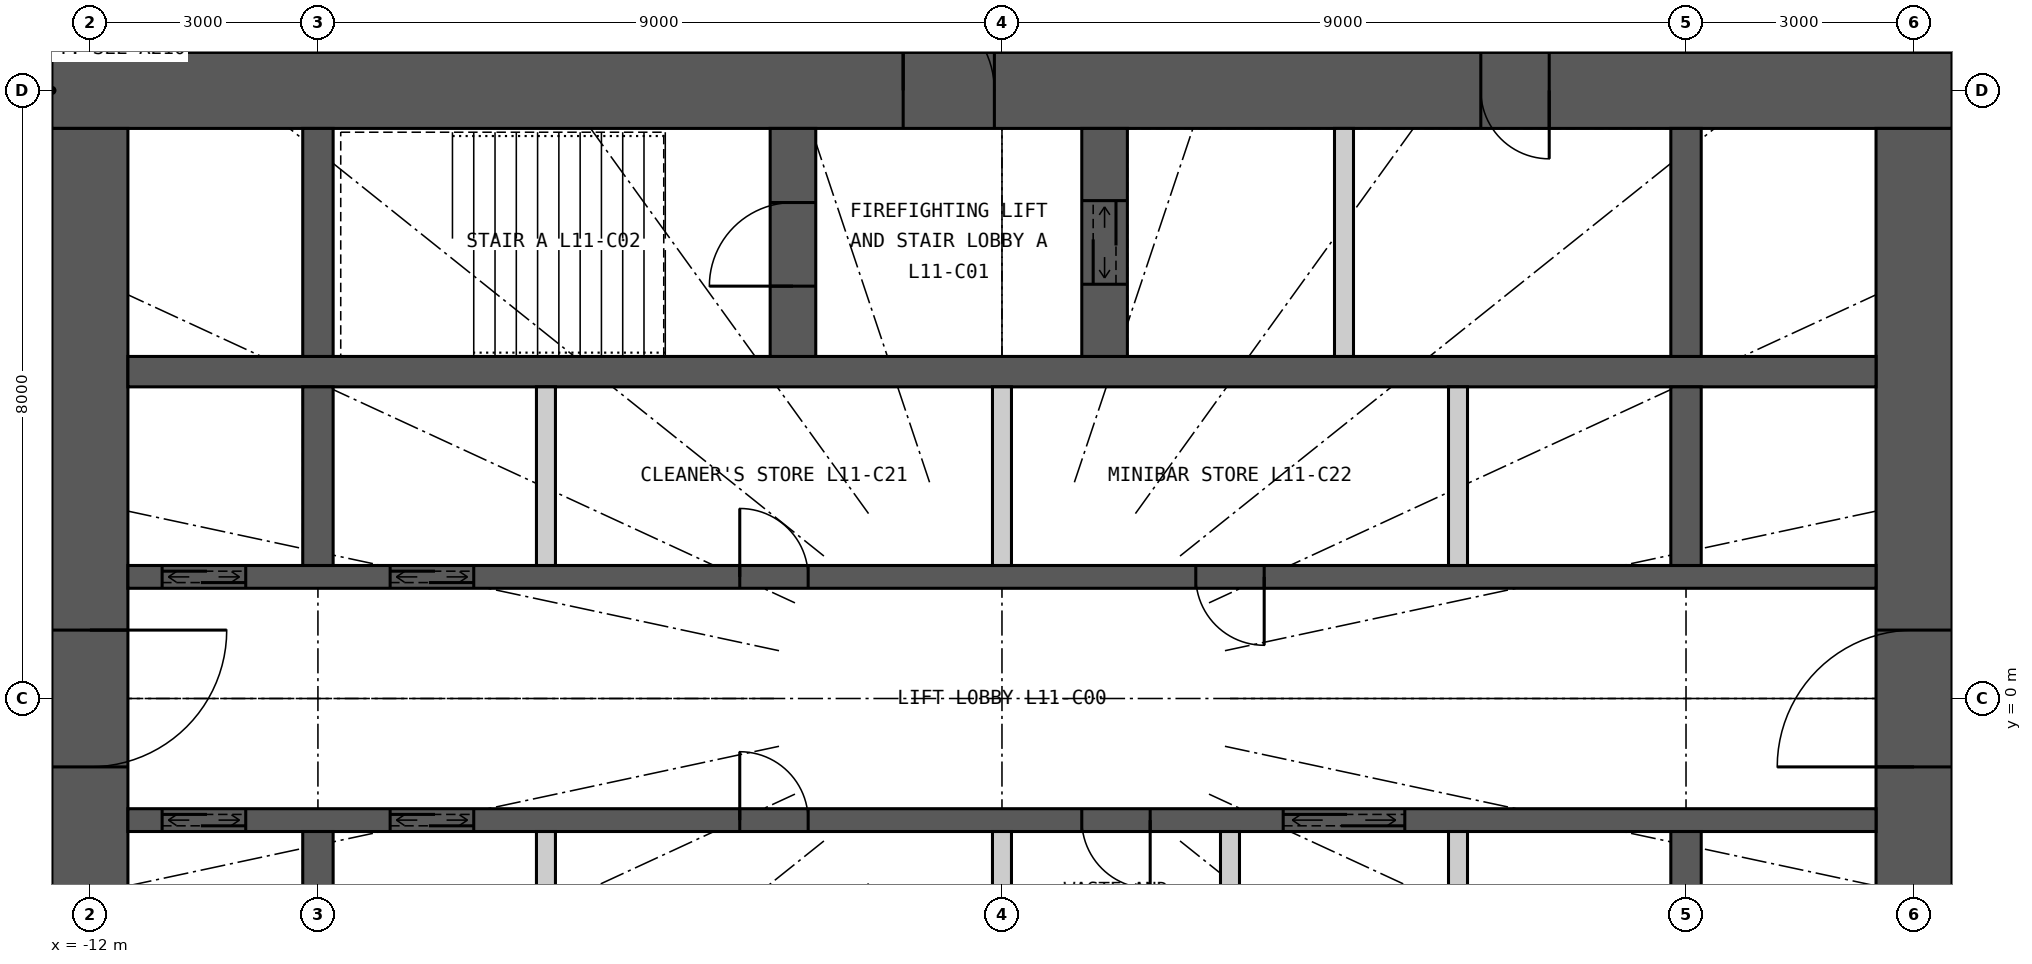
"""IFC4 building model, lengths in metres.
Left out: names, types, materials, properties, quantities, classifications, styles, units other than length and angle.
Written with IfcOpenShell. Run it as: python <this file> out.ifc"""

import sys

from ifc_helpers import new_model, si_unit, direction, frame, frame_2d, origin, place, context, subcontext, project, spatial, rectangle, extrude, element, fill, save


model = new_model("IFC4")
c1 = context("Model", 3, precision=1e-05, world=origin(), true_north=direction((0.0, 1.0)))
c2 = subcontext(c1, "Body", "Model", "MODEL_VIEW")
j1 = project(units=[si_unit("LENGTHUNIT", "METRE"), si_unit("PLANEANGLEUNIT", "RADIAN")], contexts=[c1])
p1 = place(None, origin())
s1 = spatial("IfcSite", under=j1, at=p1, CompositionType="ELEMENT")
p2 = place(p1, origin())
s2 = spatial("IfcBuilding", under=s1, at=p2, CompositionType="ELEMENT")
p3 = place(p2, frame((0.0, 0.0, 50.7)))
s3 = spatial("IfcBuildingStorey", under=s2, at=p3, CompositionType="ELEMENT", Elevation=50.7)
p4 = place(p3, frame((-12.5, 8.0, 0.0), z_axis=(0.0, 0.0, 1.0), x_axis=(1.0, 0.0, 0.0)))
e1 = element("IfcWall", 1, at=p4, inside=s3, PredefinedType="SHEAR", context=c2, shape_type="SweptSolid", body=[
    extrude(rectangle(XDim=25.0, YDim=1.0, at=frame_2d((12.5, 0.0))), origin(), (0.0, 0.0, 1.0), 3.3),
])
p5 = place(p4, frame((11.2, 0.0, 0.0)))
e2 = element("IfcOpeningElement", 2, at=p5, cuts=e1, PredefinedType="OPENING", context=c2, shape_type="SweptSolid", body=[
    extrude(rectangle(XDim=1.2, YDim=2.2, at=frame_2d((0.6, 1.1))), frame((0.0, 0.51, 0.0), z_axis=(0.0, -1.0, 0.0), x_axis=(1.0, 0.0, 0.0)), (0.0, 0.0, 1.0), 1.02),
])
p6 = place(p4, frame((18.8, 0.0, 0.0)))
e3 = element("IfcOpeningElement", 3, at=p6, cuts=e1, PredefinedType="OPENING", context=c2, shape_type="SweptSolid", body=[
    extrude(rectangle(XDim=0.9, YDim=2.2, at=frame_2d((0.45, 1.1))), frame((0.0, 0.51, 0.0), z_axis=(0.0, -1.0, 0.0), x_axis=(1.0, 0.0, 0.0)), (0.0, 0.0, 1.0), 1.02),
])
p7 = place(p3, frame((12.0, -7.5, 0.0), z_axis=(0.0, 0.0, 1.0), x_axis=(0.0, 1.0, 0.0)))
e4 = element("IfcWall", 4, at=p7, inside=s3, PredefinedType="SHEAR", context=c2, shape_type="SweptSolid", body=[
    extrude(rectangle(XDim=15.0, YDim=1.0, at=frame_2d((7.5, 0.0))), origin(), (0.0, 0.0, 1.0), 3.3),
])
p8 = place(p7, frame((6.6, 0.0, 0.0)))
e5 = element("IfcOpeningElement", 5, at=p8, cuts=e4, PredefinedType="OPENING", context=c2, shape_type="SweptSolid", body=[
    extrude(rectangle(XDim=1.8, YDim=2.2, at=frame_2d((0.9, 1.1))), frame((0.0, 0.51, 0.0), z_axis=(0.0, -1.0, 0.0), x_axis=(1.0, 0.0, 0.0)), (0.0, 0.0, 1.0), 1.02),
])
p9 = place(p3, frame((-12.0, 7.5, 0.0), z_axis=(0.0, 0.0, 1.0), x_axis=(0.0, -1.0, 0.0)))
e6 = element("IfcWall", 6, at=p9, inside=s3, PredefinedType="SHEAR", context=c2, shape_type="SweptSolid", body=[
    extrude(rectangle(XDim=15.0, YDim=1.0, at=frame_2d((7.5, 0.0))), origin(), (0.0, 0.0, 1.0), 3.3),
])
p10 = place(p9, frame((6.6, 0.0, 0.0)))
e7 = element("IfcOpeningElement", 7, at=p10, cuts=e6, PredefinedType="OPENING", context=c2, shape_type="SweptSolid", body=[
    extrude(rectangle(XDim=1.8, YDim=2.2, at=frame_2d((0.9, 1.1))), frame((0.0, 0.51, 0.0), z_axis=(0.0, -1.0, 0.0), x_axis=(1.0, 0.0, 0.0)), (0.0, 0.0, 1.0), 1.02),
])
p11 = place(p3, frame((-11.5, 4.3, 0.0), z_axis=(0.0, 0.0, 1.0), x_axis=(1.0, 0.0, 0.0)))
e8 = element("IfcWall", 8, at=p11, inside=s3, PredefinedType="SHEAR", context=c2, shape_type="SweptSolid", body=[
    extrude(rectangle(XDim=23.0, YDim=0.4, at=frame_2d((11.5, 0.0))), origin(), (0.0, 0.0, 1.0), 3.3),
])
p12 = place(p3, frame((-11.5, 1.6, 0.0), z_axis=(0.0, 0.0, 1.0), x_axis=(1.0, 0.0, 0.0)))
e9 = element("IfcWall", 9, at=p12, inside=s3, PredefinedType="SHEAR", context=c2, shape_type="SweptSolid", body=[
    extrude(rectangle(XDim=23.0, YDim=0.3, at=frame_2d((11.5, 0.0))), origin(), (0.0, 0.0, 1.0), 3.3),
])
p13 = place(p12, frame((0.45, 0.0, 0.0)))
e10 = element("IfcOpeningElement", 10, at=p13, cuts=e9, PredefinedType="OPENING", context=c2, shape_type="SweptSolid", body=[
    extrude(rectangle(XDim=1.1, YDim=2.2, at=frame_2d((0.55, 1.1))), frame((0.0, 0.16, 0.0), z_axis=(0.0, -1.0, 0.0), x_axis=(1.0, 0.0, 0.0)), (0.0, 0.0, 1.0), 0.32),
])
p14 = place(p12, frame((3.45, 0.0, 0.0)))
e11 = element("IfcOpeningElement", 11, at=p14, cuts=e9, PredefinedType="OPENING", context=c2, shape_type="SweptSolid", body=[
    extrude(rectangle(XDim=1.1, YDim=2.2, at=frame_2d((0.55, 1.1))), frame((0.0, 0.16, 0.0), z_axis=(0.0, -1.0, 0.0), x_axis=(1.0, 0.0, 0.0)), (0.0, 0.0, 1.0), 0.32),
])
p15 = place(p12, frame((8.05, 0.0, 0.0)))
e12 = element("IfcOpeningElement", 12, at=p15, cuts=e9, PredefinedType="OPENING", context=c2, shape_type="SweptSolid", body=[
    extrude(rectangle(XDim=0.9, YDim=2.2, at=frame_2d((0.45, 1.1))), frame((0.0, 0.16, 0.0), z_axis=(0.0, -1.0, 0.0), x_axis=(1.0, 0.0, 0.0)), (0.0, 0.0, 1.0), 0.32),
])
p16 = place(p12, frame((14.05, 0.0, 0.0)))
e13 = element("IfcOpeningElement", 13, at=p16, cuts=e9, PredefinedType="OPENING", context=c2, shape_type="SweptSolid", body=[
    extrude(rectangle(XDim=0.9, YDim=2.2, at=frame_2d((0.45, 1.1))), frame((0.0, 0.16, 0.0), z_axis=(0.0, -1.0, 0.0), x_axis=(1.0, 0.0, 0.0)), (0.0, 0.0, 1.0), 0.32),
])
p17 = place(p3, frame((-11.5, -1.6, 0.0), z_axis=(0.0, 0.0, 1.0), x_axis=(1.0, 0.0, 0.0)))
e14 = element("IfcWall", 14, at=p17, inside=s3, PredefinedType="SHEAR", context=c2, shape_type="SweptSolid", body=[
    extrude(rectangle(XDim=23.0, YDim=0.3, at=frame_2d((11.5, 0.0))), origin(), (0.0, 0.0, 1.0), 3.3),
])
p18 = place(p17, frame((0.45, 0.0, 0.0)))
e15 = element("IfcOpeningElement", 15, at=p18, cuts=e14, PredefinedType="OPENING", context=c2, shape_type="SweptSolid", body=[
    extrude(rectangle(XDim=1.1, YDim=2.2, at=frame_2d((0.55, 1.1))), frame((0.0, 0.16, 0.0), z_axis=(0.0, -1.0, 0.0), x_axis=(1.0, 0.0, 0.0)), (0.0, 0.0, 1.0), 0.32),
])
p19 = place(p17, frame((3.45, 0.0, 0.0)))
e16 = element("IfcOpeningElement", 16, at=p19, cuts=e14, PredefinedType="OPENING", context=c2, shape_type="SweptSolid", body=[
    extrude(rectangle(XDim=1.1, YDim=2.2, at=frame_2d((0.55, 1.1))), frame((0.0, 0.16, 0.0), z_axis=(0.0, -1.0, 0.0), x_axis=(1.0, 0.0, 0.0)), (0.0, 0.0, 1.0), 0.32),
])
p20 = place(p17, frame((15.2, 0.0, 0.0)))
e17 = element("IfcOpeningElement", 17, at=p20, cuts=e14, PredefinedType="OPENING", context=c2, shape_type="SweptSolid", body=[
    extrude(rectangle(XDim=1.6, YDim=2.4, at=frame_2d((0.8, 1.2))), frame((0.0, 0.16, 0.0), z_axis=(0.0, -1.0, 0.0), x_axis=(1.0, 0.0, 0.0)), (0.0, 0.0, 1.0), 0.32),
])
p21 = place(p17, frame((8.05, 0.0, 0.0)))
e18 = element("IfcOpeningElement", 18, at=p21, cuts=e14, PredefinedType="OPENING", context=c2, shape_type="SweptSolid", body=[
    extrude(rectangle(XDim=0.9, YDim=2.2, at=frame_2d((0.45, 1.1))), frame((0.0, 0.16, 0.0), z_axis=(0.0, -1.0, 0.0), x_axis=(1.0, 0.0, 0.0)), (0.0, 0.0, 1.0), 0.32),
])
p22 = place(p17, frame((12.55, 0.0, 0.0)))
e19 = element("IfcOpeningElement", 19, at=p22, cuts=e14, PredefinedType="OPENING", context=c2, shape_type="SweptSolid", body=[
    extrude(rectangle(XDim=0.9, YDim=2.2, at=frame_2d((0.45, 1.1))), frame((0.0, 0.16, 0.0), z_axis=(0.0, -1.0, 0.0), x_axis=(1.0, 0.0, 0.0)), (0.0, 0.0, 1.0), 0.32),
])
p23 = place(p3, frame((-9.0, 4.5, 0.0), z_axis=(0.0, 0.0, 1.0), x_axis=(0.0, 1.0, 0.0)))
e20 = element("IfcWall", 20, at=p23, inside=s3, PredefinedType="SHEAR", context=c2, shape_type="SweptSolid", body=[
    extrude(rectangle(XDim=3.0, YDim=0.4, at=frame_2d((1.5, 0.0))), origin(), (0.0, 0.0, 1.0), 3.3),
])
for number, where, z_axis, x_axis in (
    (21, (-9.0, 1.75, 0.0), (0.0, 0.0, 1.0), (0.0, 1.0, 0.0)),
    (22, (-9.0, -4.1, 0.0), (0.0, 0.0, 1.0), (0.0, 1.0, 0.0)),
):
    element("IfcWall", number, at=place(p3, frame(where, z_axis=z_axis, x_axis=x_axis)), inside=s3, PredefinedType="SHEAR", context=c2, shape_type="SweptSolid", body=[
        extrude(rectangle(XDim=2.35, YDim=0.4, at=frame_2d((1.175, 0.0))), origin(), (0.0, 0.0, 1.0), 3.3),
    ])
p24 = place(p3, frame((9.0, 4.5, 0.0), z_axis=(0.0, 0.0, 1.0), x_axis=(0.0, 1.0, 0.0)))
e23 = element("IfcWall", 23, at=p24, inside=s3, PredefinedType="SHEAR", context=c2, shape_type="SweptSolid", body=[
    extrude(rectangle(XDim=3.0, YDim=0.4, at=frame_2d((1.5, 0.0))), origin(), (0.0, 0.0, 1.0), 3.3),
])
for number, where, z_axis, x_axis in (
    (24, (9.0, 1.75, 0.0), (0.0, 0.0, 1.0), (0.0, 1.0, 0.0)),
    (25, (9.0, -4.1, 0.0), (0.0, 0.0, 1.0), (0.0, 1.0, 0.0)),
):
    element("IfcWall", number, at=place(p3, frame(where, z_axis=z_axis, x_axis=x_axis)), inside=s3, PredefinedType="SHEAR", context=c2, shape_type="SweptSolid", body=[
        extrude(rectangle(XDim=2.35, YDim=0.4, at=frame_2d((1.175, 0.0))), origin(), (0.0, 0.0, 1.0), 3.3),
    ])
p25 = place(p3, frame((-2.75, 4.5, 0.0), z_axis=(0.0, 0.0, 1.0), x_axis=(0.0, 1.0, 0.0)))
e26 = element("IfcWall", 26, at=p25, inside=s3, PredefinedType="SHEAR", context=c2, shape_type="SweptSolid", body=[
    extrude(rectangle(XDim=3.0, YDim=0.6, at=frame_2d((1.5, 0.0))), origin(), (0.0, 0.0, 1.0), 3.3),
])
p26 = place(p25, frame((0.925, 0.0, 0.0)))
e27 = element("IfcOpeningElement", 27, at=p26, cuts=e26, PredefinedType="OPENING", context=c2, shape_type="SweptSolid", body=[
    extrude(rectangle(XDim=1.1, YDim=2.2, at=frame_2d((0.55, 1.1))), frame((0.0, 0.31, 0.0), z_axis=(0.0, -1.0, 0.0), x_axis=(1.0, 0.0, 0.0)), (0.0, 0.0, 1.0), 0.62),
])
p27 = place(p3, frame((1.35, 4.5, 0.0), z_axis=(0.0, 0.0, 1.0), x_axis=(0.0, 1.0, 0.0)))
e28 = element("IfcWall", 28, at=p27, inside=s3, PredefinedType="SHEAR", context=c2, shape_type="SweptSolid", body=[
    extrude(rectangle(XDim=3.0, YDim=0.6, at=frame_2d((1.5, 0.0))), origin(), (0.0, 0.0, 1.0), 3.3),
])
p28 = place(p27, frame((0.95, 0.0, 0.0)))
e29 = element("IfcOpeningElement", 29, at=p28, cuts=e28, PredefinedType="OPENING", context=c2, shape_type="SweptSolid", body=[
    extrude(rectangle(XDim=1.1, YDim=2.2, at=frame_2d((0.55, 1.1))), frame((0.0, 0.31, 0.0), z_axis=(0.0, -1.0, 0.0), x_axis=(1.0, 0.0, 0.0)), (0.0, 0.0, 1.0), 0.62),
])
p29 = place(p3, frame((4.5, 4.5, 0.0), z_axis=(0.0, 0.0, 1.0), x_axis=(0.0, 1.0, 0.0)))
e30 = element("IfcWall", 30, at=p29, inside=s3, PredefinedType="PARTITIONING", context=c2, shape_type="SweptSolid", body=[
    extrude(rectangle(XDim=3.0, YDim=0.25, at=frame_2d((1.5, 0.0))), origin(), (0.0, 0.0, 1.0), 3.3),
])
for number, where, z_axis, x_axis in (
    (31, (-6.0, 1.75, 0.0), (0.0, 0.0, 1.0), (0.0, 1.0, 0.0)),
    (32, (0.0, 1.75, 0.0), (0.0, 0.0, 1.0), (0.0, 1.0, 0.0)),
    (33, (6.0, 1.75, 0.0), (0.0, 0.0, 1.0), (0.0, 1.0, 0.0)),
    (34, (-6.0, -4.1, 0.0), (0.0, 0.0, 1.0), (0.0, 1.0, 0.0)),
    (35, (0.0, -4.1, 0.0), (0.0, 0.0, 1.0), (0.0, 1.0, 0.0)),
    (36, (3.0, -4.1, 0.0), (0.0, 0.0, 1.0), (0.0, 1.0, 0.0)),
    (37, (6.0, -4.1, 0.0), (0.0, 0.0, 1.0), (0.0, 1.0, 0.0)),
):
    element("IfcWall", number, at=place(p3, frame(where, z_axis=z_axis, x_axis=x_axis)), inside=s3, PredefinedType="PARTITIONING", context=c2, shape_type="SweptSolid", body=[
        extrude(rectangle(XDim=2.35, YDim=0.25, at=frame_2d((1.175, 0.0))), origin(), (0.0, 0.0, 1.0), 3.3),
    ])
p30 = place(p5, origin())
e38 = element("IfcDoor", 38, at=p30, inside=s3, OperationType="SINGLE_SWING_LEFT", PredefinedType="DOOR", context=c2, shape_type="SweptSolid", body=[
    extrude(rectangle(XDim=1.2, YDim=2.2, at=frame_2d((0.6, 1.1))), frame((0.0, 0.025, 0.0), z_axis=(0.0, -1.0, 0.0), x_axis=(1.0, 0.0, 0.0)), (0.0, 0.0, 1.0), 0.05),
])
fill(e2, e38)
p31 = place(p26, origin())
e39 = element("IfcDoor", 39, at=p31, inside=s3, OperationType="SINGLE_SWING_LEFT", PredefinedType="DOOR", context=c2, shape_type="SweptSolid", body=[
    extrude(rectangle(XDim=1.1, YDim=2.2, at=frame_2d((0.55, 1.1))), frame((0.0, 0.025, 0.0), z_axis=(0.0, -1.0, 0.0), x_axis=(1.0, 0.0, 0.0)), (0.0, 0.0, 1.0), 0.05),
])
fill(e27, e39)
p32 = place(p28, origin())
e40 = element("IfcDoor", 40, at=p32, inside=s3, OperationType="DOUBLE_DOOR_SLIDING", PredefinedType="DOOR", context=c2, shape_type="SweptSolid", body=[
    extrude(rectangle(XDim=1.1, YDim=2.2, at=frame_2d((0.55, 1.1))), frame((0.0, 0.025, 0.0), z_axis=(0.0, -1.0, 0.0), x_axis=(1.0, 0.0, 0.0)), (0.0, 0.0, 1.0), 0.05),
])
fill(e29, e40)
p33 = place(p6, origin())
e41 = element("IfcDoor", 41, at=p33, inside=s3, OperationType="SINGLE_SWING_RIGHT", PredefinedType="DOOR", context=c2, shape_type="SweptSolid", body=[
    extrude(rectangle(XDim=0.9, YDim=2.2, at=frame_2d((0.45, 1.1))), frame((0.0, 0.025, 0.0), z_axis=(0.0, -1.0, 0.0), x_axis=(1.0, 0.0, 0.0)), (0.0, 0.0, 1.0), 0.05),
])
fill(e3, e41)
p34 = place(p13, origin())
e42 = element("IfcDoor", 42, at=p34, inside=s3, OperationType="DOUBLE_DOOR_SLIDING", PredefinedType="DOOR", context=c2, shape_type="SweptSolid", body=[
    extrude(rectangle(XDim=1.1, YDim=2.2, at=frame_2d((0.55, 1.1))), frame((0.0, 0.025, 0.0), z_axis=(0.0, -1.0, 0.0), x_axis=(1.0, 0.0, 0.0)), (0.0, 0.0, 1.0), 0.05),
])
fill(e10, e42)
p35 = place(p14, origin())
e43 = element("IfcDoor", 43, at=p35, inside=s3, OperationType="DOUBLE_DOOR_SLIDING", PredefinedType="DOOR", context=c2, shape_type="SweptSolid", body=[
    extrude(rectangle(XDim=1.1, YDim=2.2, at=frame_2d((0.55, 1.1))), frame((0.0, 0.025, 0.0), z_axis=(0.0, -1.0, 0.0), x_axis=(1.0, 0.0, 0.0)), (0.0, 0.0, 1.0), 0.05),
])
fill(e11, e43)
p36 = place(p18, origin())
e44 = element("IfcDoor", 44, at=p36, inside=s3, OperationType="DOUBLE_DOOR_SLIDING", PredefinedType="DOOR", context=c2, shape_type="SweptSolid", body=[
    extrude(rectangle(XDim=1.1, YDim=2.2, at=frame_2d((0.55, 1.1))), frame((0.0, 0.025, 0.0), z_axis=(0.0, -1.0, 0.0), x_axis=(1.0, 0.0, 0.0)), (0.0, 0.0, 1.0), 0.05),
])
fill(e15, e44)
p37 = place(p19, origin())
e45 = element("IfcDoor", 45, at=p37, inside=s3, OperationType="DOUBLE_DOOR_SLIDING", PredefinedType="DOOR", context=c2, shape_type="SweptSolid", body=[
    extrude(rectangle(XDim=1.1, YDim=2.2, at=frame_2d((0.55, 1.1))), frame((0.0, 0.025, 0.0), z_axis=(0.0, -1.0, 0.0), x_axis=(1.0, 0.0, 0.0)), (0.0, 0.0, 1.0), 0.05),
])
fill(e16, e45)
p38 = place(p20, origin())
e46 = element("IfcDoor", 46, at=p38, inside=s3, OperationType="DOUBLE_DOOR_SLIDING", PredefinedType="DOOR", context=c2, shape_type="SweptSolid", body=[
    extrude(rectangle(XDim=1.6, YDim=2.4, at=frame_2d((0.8, 1.2))), frame((0.0, 0.025, 0.0), z_axis=(0.0, -1.0, 0.0), x_axis=(1.0, 0.0, 0.0)), (0.0, 0.0, 1.0), 0.05),
])
fill(e17, e46)
p39 = place(p15, origin())
e47 = element("IfcDoor", 47, at=p39, inside=s3, OperationType="SINGLE_SWING_LEFT", PredefinedType="DOOR", context=c2, shape_type="SweptSolid", body=[
    extrude(rectangle(XDim=0.9, YDim=2.2, at=frame_2d((0.45, 1.1))), frame((0.0, 0.025, 0.0), z_axis=(0.0, -1.0, 0.0), x_axis=(1.0, 0.0, 0.0)), (0.0, 0.0, 1.0), 0.05),
])
fill(e12, e47)
p40 = place(p16, origin())
e48 = element("IfcDoor", 48, at=p40, inside=s3, OperationType="SINGLE_SWING_RIGHT", PredefinedType="DOOR", context=c2, shape_type="SweptSolid", body=[
    extrude(rectangle(XDim=0.9, YDim=2.2, at=frame_2d((0.45, 1.1))), frame((0.0, 0.025, 0.0), z_axis=(0.0, -1.0, 0.0), x_axis=(1.0, 0.0, 0.0)), (0.0, 0.0, 1.0), 0.05),
])
fill(e13, e48)
p41 = place(p21, origin())
e49 = element("IfcDoor", 49, at=p41, inside=s3, OperationType="SINGLE_SWING_LEFT", PredefinedType="DOOR", context=c2, shape_type="SweptSolid", body=[
    extrude(rectangle(XDim=0.9, YDim=2.2, at=frame_2d((0.45, 1.1))), frame((0.0, 0.025, 0.0), z_axis=(0.0, -1.0, 0.0), x_axis=(1.0, 0.0, 0.0)), (0.0, 0.0, 1.0), 0.05),
])
fill(e18, e49)
p42 = place(p22, origin())
e50 = element("IfcDoor", 50, at=p42, inside=s3, OperationType="SINGLE_SWING_RIGHT", PredefinedType="DOOR", context=c2, shape_type="SweptSolid", body=[
    extrude(rectangle(XDim=0.9, YDim=2.2, at=frame_2d((0.45, 1.1))), frame((0.0, 0.025, 0.0), z_axis=(0.0, -1.0, 0.0), x_axis=(1.0, 0.0, 0.0)), (0.0, 0.0, 1.0), 0.05),
])
fill(e19, e50)
p43 = place(p8, origin())
e51 = element("IfcDoor", 51, at=p43, inside=s3, OperationType="DOUBLE_DOOR_DOUBLE_SWING", PredefinedType="DOOR", context=c2, shape_type="SweptSolid", body=[
    extrude(rectangle(XDim=1.8, YDim=2.2, at=frame_2d((0.9, 1.1))), frame((0.0, 0.025, 0.0), z_axis=(0.0, -1.0, 0.0), x_axis=(1.0, 0.0, 0.0)), (0.0, 0.0, 1.0), 0.05),
])
fill(e5, e51)
p44 = place(p10, origin())
e52 = element("IfcDoor", 52, at=p44, inside=s3, OperationType="DOUBLE_DOOR_DOUBLE_SWING", PredefinedType="DOOR", context=c2, shape_type="SweptSolid", body=[
    extrude(rectangle(XDim=1.8, YDim=2.2, at=frame_2d((0.9, 1.1))), frame((0.0, 0.025, 0.0), z_axis=(0.0, -1.0, 0.0), x_axis=(1.0, 0.0, 0.0)), (0.0, 0.0, 1.0), 0.05),
])
fill(e7, e52)
save(model, sys.argv[1])
